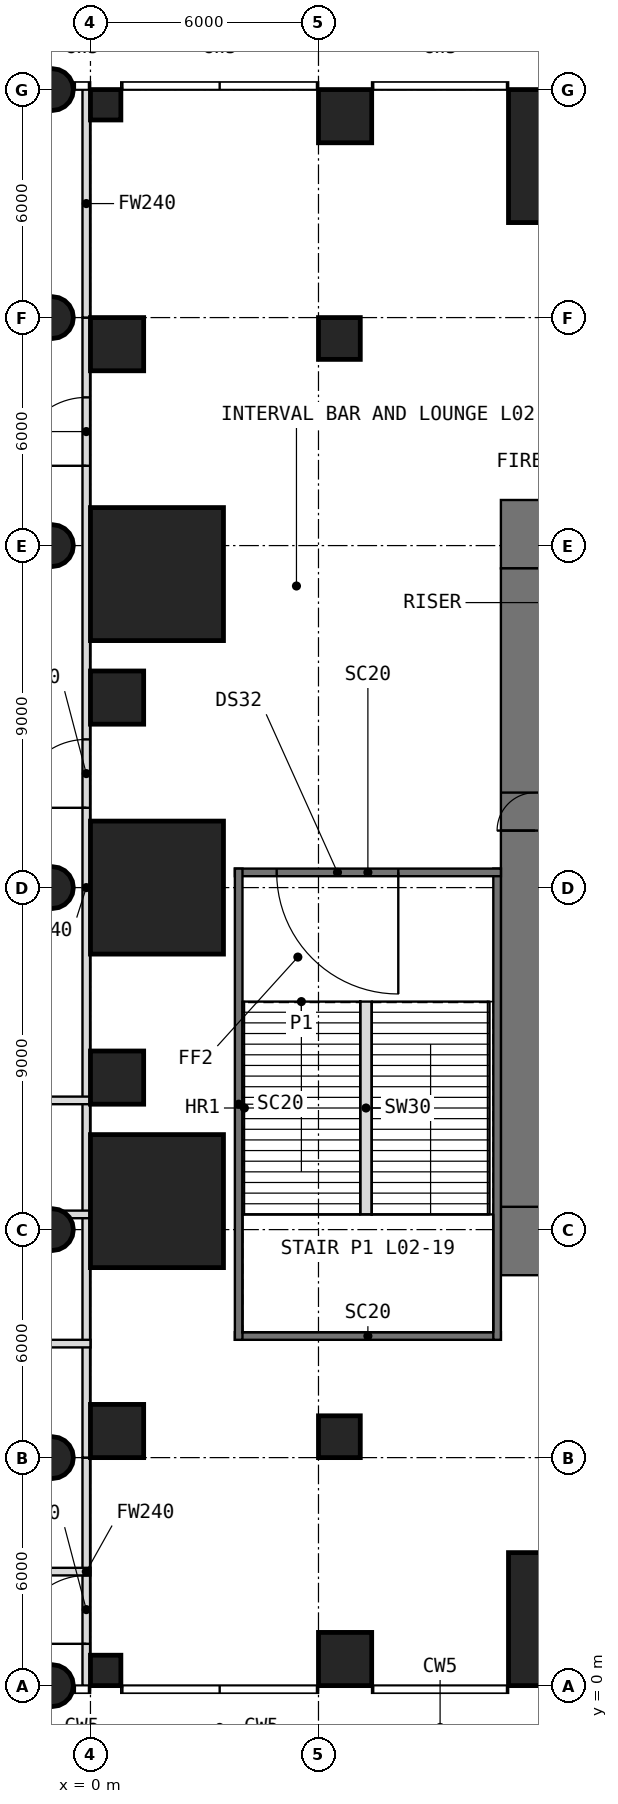
"""IFC4 building model, lengths in metres.
Left out: names, types, materials, properties, quantities, classifications, styles, units other than length and angle.
Written with IfcOpenShell. Run it as: python <this file> out.ifc"""

import sys

from ifc_helpers import new_model, si_unit, direction, frame, frame_2d, origin, origin_2d, place, context, subcontext, project, spatial, rectangle, circle, extrude, element, fill, save


model = new_model("IFC4")
c1 = context("Model", 3, precision=1e-05, world=origin(), true_north=direction((0.0, 1.0)))
c2 = subcontext(c1, "Body", "Model", "MODEL_VIEW")
j1 = project(units=[si_unit("LENGTHUNIT", "METRE"), si_unit("PLANEANGLEUNIT", "RADIAN")], contexts=[c1])
p1 = place(None, origin())
s1 = spatial("IfcSite", under=j1, at=p1, CompositionType="ELEMENT")
p2 = place(p1, origin())
s2 = spatial("IfcBuilding", under=s1, at=p2, CompositionType="ELEMENT")
p3 = place(p2, frame((0.0, 0.0, 11.0)))
s3 = spatial("IfcBuildingStorey", under=s2, at=p3, CompositionType="ELEMENT", Elevation=11.0)
p4 = place(p3, frame((-1.0, 0.0, 0.0), z_axis=(0.0, 0.0, 1.0), x_axis=(1.0, 0.0, 0.0)))
e1 = element("IfcColumn", 1, at=p4, inside=s3, PredefinedType="COLUMN", context=c2, shape_type="SweptSolid", body=[
    extrude(circle(Radius=0.55, at=origin_2d()), origin(), (0.0, 0.0, 1.0), 7.0),
])
p5 = place(p3, frame((0.4, 0.4, 0.0), z_axis=(0.0, 0.0, 1.0), x_axis=(1.0, 0.0, 0.0)))
e2 = element("IfcColumn", 2, at=p5, inside=s3, PredefinedType="COLUMN", context=c2, shape_type="SweptSolid", body=[
    extrude(rectangle(XDim=0.8, YDim=0.8, at=origin_2d()), origin(), (0.0, 0.0, 1.0), 7.0),
])
p6 = place(p3, frame((6.7, 0.7, 0.0), z_axis=(0.0, 0.0, 1.0), x_axis=(1.0, 0.0, 0.0)))
e3 = element("IfcColumn", 3, at=p6, inside=s3, PredefinedType="COLUMN", context=c2, shape_type="SweptSolid", body=[
    extrude(rectangle(XDim=1.4, YDim=1.4, at=origin_2d()), origin(), (0.0, 0.0, 1.0), 7.0),
])
p7 = place(p3, frame((12.75, 1.75, 0.0), z_axis=(0.0, 0.0, 1.0), x_axis=(1.0, 0.0, 0.0)))
e4 = element("IfcColumn", 4, at=p7, inside=s3, PredefinedType="COLUMN", context=c2, shape_type="SweptSolid", body=[
    extrude(rectangle(XDim=3.5, YDim=3.5, at=origin_2d()), origin(), (0.0, 0.0, 1.0), 7.0),
])
p8 = place(p3, frame((-1.0, 6.0, 0.0), z_axis=(0.0, 0.0, 1.0), x_axis=(1.0, 0.0, 0.0)))
e5 = element("IfcColumn", 5, at=p8, inside=s3, PredefinedType="COLUMN", context=c2, shape_type="SweptSolid", body=[
    extrude(circle(Radius=0.55, at=origin_2d()), origin(), (0.0, 0.0, 1.0), 7.0),
])
p9 = place(p3, frame((0.7, 6.7, 0.0), z_axis=(0.0, 0.0, 1.0), x_axis=(1.0, 0.0, 0.0)))
e6 = element("IfcColumn", 6, at=p9, inside=s3, PredefinedType="COLUMN", context=c2, shape_type="SweptSolid", body=[
    extrude(rectangle(XDim=1.4, YDim=1.4, at=origin_2d()), origin(), (0.0, 0.0, 1.0), 7.0),
])
p10 = place(p3, frame((6.55, 6.55, 0.0), z_axis=(0.0, 0.0, 1.0), x_axis=(1.0, 0.0, 0.0)))
e7 = element("IfcColumn", 7, at=p10, inside=s3, PredefinedType="COLUMN", context=c2, shape_type="SweptSolid", body=[
    extrude(rectangle(XDim=1.1, YDim=1.1, at=origin_2d()), origin(), (0.0, 0.0, 1.0), 7.0),
])
p11 = place(p3, frame((1.75, 12.75, 0.0), z_axis=(0.0, 0.0, 1.0), x_axis=(1.0, 0.0, 0.0)))
e8 = element("IfcColumn", 8, at=p11, inside=s3, PredefinedType="COLUMN", context=c2, shape_type="SweptSolid", body=[
    extrude(rectangle(XDim=3.5, YDim=3.5, at=origin_2d()), origin(), (0.0, 0.0, 1.0), 7.0),
])
p12 = place(p3, frame((-1.0, 12.0, 0.0), z_axis=(0.0, 0.0, 1.0), x_axis=(1.0, 0.0, 0.0)))
e9 = element("IfcColumn", 9, at=p12, inside=s3, PredefinedType="COLUMN", context=c2, shape_type="SweptSolid", body=[
    extrude(circle(Radius=0.55, at=origin_2d()), origin(), (0.0, 0.0, 1.0), 7.0),
])
p13 = place(p3, frame((-1.41, 12.0, 3.556), z_axis=(0.0, 0.0, 1.0), x_axis=(1.0, 0.0, 0.0)))
e10 = element("IfcOpeningElement", 10, at=p13, cuts=e9, PredefinedType="RECESS", context=c2, shape_type="SweptSolid", body=[
    extrude(rectangle(XDim=0.32, YDim=0.474, at=origin_2d()), origin(), (0.0, 0.0, 1.0), 0.719),
])
p14 = place(p3, frame((0.7, 16.0, 0.0), z_axis=(0.0, 0.0, 1.0), x_axis=(1.0, 0.0, 0.0)))
e11 = element("IfcColumn", 11, at=p14, inside=s3, PredefinedType="COLUMN", context=c2, shape_type="SweptSolid", body=[
    extrude(rectangle(XDim=1.4, YDim=1.4, at=origin_2d()), origin(), (0.0, 0.0, 1.0), 7.0),
])
p15 = place(p3, frame((-1.0, 21.0, 0.0), z_axis=(0.0, 0.0, 1.0), x_axis=(1.0, 0.0, 0.0)))
e12 = element("IfcColumn", 12, at=p15, inside=s3, PredefinedType="COLUMN", context=c2, shape_type="SweptSolid", body=[
    extrude(circle(Radius=0.55, at=origin_2d()), origin(), (0.0, 0.0, 1.0), 7.0),
])
p16 = place(p3, frame((-1.41, 21.0, 3.556), z_axis=(0.0, 0.0, 1.0), x_axis=(1.0, 0.0, 0.0)))
e13 = element("IfcOpeningElement", 13, at=p16, cuts=e12, PredefinedType="RECESS", context=c2, shape_type="SweptSolid", body=[
    extrude(rectangle(XDim=0.32, YDim=0.474, at=origin_2d()), origin(), (0.0, 0.0, 1.0), 0.719),
])
p17 = place(p3, frame((1.75, 21.0, 0.0), z_axis=(0.0, 0.0, 1.0), x_axis=(1.0, 0.0, 0.0)))
e14 = element("IfcColumn", 14, at=p17, inside=s3, PredefinedType="COLUMN", context=c2, shape_type="SweptSolid", body=[
    extrude(rectangle(XDim=3.5, YDim=3.5, at=origin_2d()), origin(), (0.0, 0.0, 1.0), 7.0),
])
p18 = place(p3, frame((0.7, 26.0, 0.0), z_axis=(0.0, 0.0, 1.0), x_axis=(1.0, 0.0, 0.0)))
e15 = element("IfcColumn", 15, at=p18, inside=s3, PredefinedType="COLUMN", context=c2, shape_type="SweptSolid", body=[
    extrude(rectangle(XDim=1.4, YDim=1.4, at=origin_2d()), origin(), (0.0, 0.0, 1.0), 7.0),
])
p19 = place(p3, frame((-1.0, 30.0, 0.0), z_axis=(0.0, 0.0, 1.0), x_axis=(1.0, 0.0, 0.0)))
e16 = element("IfcColumn", 16, at=p19, inside=s3, PredefinedType="COLUMN", context=c2, shape_type="SweptSolid", body=[
    extrude(circle(Radius=0.55, at=origin_2d()), origin(), (0.0, 0.0, 1.0), 7.0),
])
p20 = place(p3, frame((-1.41, 30.0, 3.556), z_axis=(0.0, 0.0, 1.0), x_axis=(1.0, 0.0, 0.0)))
e17 = element("IfcOpeningElement", 17, at=p20, cuts=e16, PredefinedType="RECESS", context=c2, shape_type="SweptSolid", body=[
    extrude(rectangle(XDim=0.32, YDim=0.474, at=origin_2d()), origin(), (0.0, 0.0, 1.0), 0.719),
])
p21 = place(p3, frame((1.75, 29.25, 0.0), z_axis=(0.0, 0.0, 1.0), x_axis=(1.0, 0.0, 0.0)))
e18 = element("IfcColumn", 18, at=p21, inside=s3, PredefinedType="COLUMN", context=c2, shape_type="SweptSolid", body=[
    extrude(rectangle(XDim=3.5, YDim=3.5, at=origin_2d()), origin(), (0.0, 0.0, 1.0), 7.0),
])
p22 = place(p3, frame((-1.0, 36.0, 0.0), z_axis=(0.0, 0.0, 1.0), x_axis=(1.0, 0.0, 0.0)))
e19 = element("IfcColumn", 19, at=p22, inside=s3, PredefinedType="COLUMN", context=c2, shape_type="SweptSolid", body=[
    extrude(circle(Radius=0.55, at=origin_2d()), origin(), (0.0, 0.0, 1.0), 7.0),
])
p23 = place(p3, frame((-1.41, 36.0, 3.556), z_axis=(0.0, 0.0, 1.0), x_axis=(1.0, 0.0, 0.0)))
e20 = element("IfcOpeningElement", 20, at=p23, cuts=e19, PredefinedType="RECESS", context=c2, shape_type="SweptSolid", body=[
    extrude(rectangle(XDim=0.32, YDim=0.474, at=origin_2d()), origin(), (0.0, 0.0, 1.0), 0.719),
])
p24 = place(p3, frame((0.7, 35.3, 0.0), z_axis=(0.0, 0.0, 1.0), x_axis=(1.0, 0.0, 0.0)))
e21 = element("IfcColumn", 21, at=p24, inside=s3, PredefinedType="COLUMN", context=c2, shape_type="SweptSolid", body=[
    extrude(rectangle(XDim=1.4, YDim=1.4, at=origin_2d()), origin(), (0.0, 0.0, 1.0), 7.0),
])
p25 = place(p3, frame((6.55, 35.45, 0.0), z_axis=(0.0, 0.0, 1.0), x_axis=(1.0, 0.0, 0.0)))
e22 = element("IfcColumn", 22, at=p25, inside=s3, PredefinedType="COLUMN", context=c2, shape_type="SweptSolid", body=[
    extrude(rectangle(XDim=1.1, YDim=1.1, at=origin_2d()), origin(), (0.0, 0.0, 1.0), 7.0),
])
p26 = place(p3, frame((-1.0, 42.0, 0.0), z_axis=(0.0, 0.0, 1.0), x_axis=(1.0, 0.0, 0.0)))
e23 = element("IfcColumn", 23, at=p26, inside=s3, PredefinedType="COLUMN", context=c2, shape_type="SweptSolid", body=[
    extrude(circle(Radius=0.55, at=origin_2d()), origin(), (0.0, 0.0, 1.0), 7.0),
])
p27 = place(p3, frame((0.4, 41.6, 0.0), z_axis=(0.0, 0.0, 1.0), x_axis=(1.0, 0.0, 0.0)))
e24 = element("IfcColumn", 24, at=p27, inside=s3, PredefinedType="COLUMN", context=c2, shape_type="SweptSolid", body=[
    extrude(rectangle(XDim=0.8, YDim=0.8, at=origin_2d()), origin(), (0.0, 0.0, 1.0), 7.0),
])
p28 = place(p3, frame((6.7, 41.3, 0.0), z_axis=(0.0, 0.0, 1.0), x_axis=(1.0, 0.0, 0.0)))
e25 = element("IfcColumn", 25, at=p28, inside=s3, PredefinedType="COLUMN", context=c2, shape_type="SweptSolid", body=[
    extrude(rectangle(XDim=1.4, YDim=1.4, at=origin_2d()), origin(), (0.0, 0.0, 1.0), 7.0),
])
p29 = place(p3, frame((12.75, 40.25, 0.0), z_axis=(0.0, 0.0, 1.0), x_axis=(1.0, 0.0, 0.0)))
e26 = element("IfcColumn", 26, at=p29, inside=s3, PredefinedType="COLUMN", context=c2, shape_type="SweptSolid", body=[
    extrude(rectangle(XDim=3.5, YDim=3.5, at=origin_2d()), origin(), (0.0, 0.0, 1.0), 7.0),
])
p30 = place(p3, frame((10.8, 11.7, -0.3), z_axis=(0.0, 0.0, 1.0), x_axis=(1.0, 0.0, 0.0)))
e27 = element("IfcWall", 27, at=p30, inside=s3, PredefinedType="SHEAR", context=c2, shape_type="SweptSolid", body=[
    extrude(rectangle(XDim=20.4, YDim=1.8, at=frame_2d((10.2, 0.0))), origin(), (0.0, 0.0, 1.0), 7.1),
])
p31 = place(p30, frame((9.2, 0.0, 0.3)))
e28 = element("IfcOpeningElement", 28, at=p31, cuts=e27, PredefinedType="OPENING", context=c2, shape_type="SweptSolid", body=[
    extrude(rectangle(XDim=2.0, YDim=2.2, at=frame_2d((1.0, 1.1))), frame((0.0, 0.91, 0.0), z_axis=(0.0, -1.0, 0.0), x_axis=(1.0, 0.0, 0.0)), (0.0, 0.0, 1.0), 1.82),
])
p32 = place(p3, frame((10.8, 30.3, -0.3), z_axis=(0.0, 0.0, 1.0), x_axis=(1.0, 0.0, 0.0)))
e29 = element("IfcWall", 29, at=p32, inside=s3, PredefinedType="SHEAR", context=c2, shape_type="SweptSolid", body=[
    extrude(rectangle(XDim=20.4, YDim=1.8, at=frame_2d((10.2, 0.0))), origin(), (0.0, 0.0, 1.0), 7.1),
])
p33 = place(p32, frame((9.2, 0.0, 0.3)))
e30 = element("IfcOpeningElement", 30, at=p33, cuts=e29, PredefinedType="OPENING", context=c2, shape_type="SweptSolid", body=[
    extrude(rectangle(XDim=2.0, YDim=2.2, at=frame_2d((1.0, 1.1))), frame((0.0, 0.91, 0.0), z_axis=(0.0, -1.0, 0.0), x_axis=(1.0, 0.0, 0.0)), (0.0, 0.0, 1.0), 1.82),
])
p34 = place(p3, frame((11.7, 12.6, -0.3), z_axis=(0.0, 0.0, 1.0), x_axis=(0.0, 1.0, 0.0)))
e31 = element("IfcWall", 31, at=p34, inside=s3, PredefinedType="SHEAR", context=c2, shape_type="SweptSolid", body=[
    extrude(rectangle(XDim=16.8, YDim=1.8, at=frame_2d((8.4, 0.0))), origin(), (0.0, 0.0, 1.0), 7.1),
])
p35 = place(p34, frame((9.9, 0.0, 0.3)))
e32 = element("IfcOpeningElement", 32, at=p35, cuts=e31, PredefinedType="OPENING", context=c2, shape_type="SweptSolid", body=[
    extrude(rectangle(XDim=1.0, YDim=2.2, at=frame_2d((0.5, 1.1))), frame((0.0, 0.91, 0.0), z_axis=(0.0, -1.0, 0.0), x_axis=(1.0, 0.0, 0.0)), (0.0, 0.0, 1.0), 1.82),
])
p36 = place(p3, frame((3.8, 9.2, -0.3), z_axis=(0.0, 0.0, 1.0), x_axis=(1.0, 0.0, 0.0)))
e33 = element("IfcWall", 33, at=p36, inside=s3, PredefinedType="SOLIDWALL", context=c2, shape_type="SweptSolid", body=[
    extrude(rectangle(XDim=7.0, YDim=0.2, at=frame_2d((3.5, 0.0))), origin(), (0.0, 0.0, 1.0), 7.1),
])
p37 = place(p3, frame((10.7, 9.1, -0.3), z_axis=(0.0, 0.0, 1.0), x_axis=(0.0, 1.0, 0.0)))
e34 = element("IfcWall", 34, at=p37, inside=s3, PredefinedType="SOLIDWALL", context=c2, shape_type="SweptSolid", body=[
    extrude(rectangle(XDim=12.4, YDim=0.2, at=frame_2d((6.2, 0.0))), origin(), (0.0, 0.0, 1.0), 7.1),
])
p38 = place(p3, frame((10.8, 21.4, -0.3), z_axis=(0.0, 0.0, 1.0), x_axis=(-1.0, 0.0, 0.0)))
e35 = element("IfcWall", 35, at=p38, inside=s3, PredefinedType="SOLIDWALL", context=c2, shape_type="SweptSolid", body=[
    extrude(rectangle(XDim=7.0, YDim=0.2, at=frame_2d((3.5, 0.0))), origin(), (0.0, 0.0, 1.0), 7.1),
])
p39 = place(p38, frame((2.7, 0.0, 0.3)))
e36 = element("IfcOpeningElement", 36, at=p39, cuts=e35, PredefinedType="OPENING", context=c2, shape_type="SweptSolid", body=[
    extrude(rectangle(XDim=3.2, YDim=2.4, at=frame_2d((1.6, 1.2))), frame((0.0, 0.11, 0.0), z_axis=(0.0, -1.0, 0.0), x_axis=(1.0, 0.0, 0.0)), (0.0, 0.0, 1.0), 0.22),
])
p40 = place(p3, frame((3.9, 21.5, -0.3), z_axis=(0.0, 0.0, 1.0), x_axis=(0.0, -1.0, 0.0)))
e37 = element("IfcWall", 37, at=p40, inside=s3, PredefinedType="SOLIDWALL", context=c2, shape_type="SweptSolid", body=[
    extrude(rectangle(XDim=12.4, YDim=0.2, at=frame_2d((6.2, 0.0))), origin(), (0.0, 0.0, 1.0), 7.1),
])
p41 = place(p3, frame((-0.11, 0.0, 0.0), z_axis=(0.0, 0.0, 1.0), x_axis=(0.0, 1.0, 0.0)))
e38 = element("IfcWall", 38, at=p41, inside=s3, PredefinedType="PARTITIONING", context=c2, shape_type="SweptSolid", body=[
    extrude(rectangle(XDim=6.0, YDim=0.2, at=frame_2d((3.0, 0.0))), origin(), (0.0, 0.0, 1.0), 5.98),
])
p42 = place(p41, frame((1.1, 0.0, 0.0)))
e39 = element("IfcOpeningElement", 39, at=p42, cuts=e38, PredefinedType="OPENING", context=c2, shape_type="SweptSolid", body=[
    extrude(rectangle(XDim=1.8, YDim=2.4, at=frame_2d((0.9, 1.2))), frame((0.0, 0.11, 0.0), z_axis=(0.0, -1.0, 0.0), x_axis=(1.0, 0.0, 0.0)), (0.0, 0.0, 1.0), 0.22),
])
p43 = place(p3, frame((-0.11, 6.0, 0.0), z_axis=(0.0, 0.0, 1.0), x_axis=(0.0, 1.0, 0.0)))
e40 = element("IfcWall", 40, at=p43, inside=s3, PredefinedType="PARTITIONING", context=c2, shape_type="SweptSolid", body=[
    extrude(rectangle(XDim=30.0, YDim=0.2, at=frame_2d((15.0, 0.0))), origin(), (0.0, 0.0, 1.0), 6.6),
])
p44 = place(p43, frame((17.1, 0.0, 0.0)))
e41 = element("IfcOpeningElement", 41, at=p44, cuts=e40, PredefinedType="OPENING", context=c2, shape_type="SweptSolid", body=[
    extrude(rectangle(XDim=1.8, YDim=2.4, at=frame_2d((0.9, 1.2))), frame((0.0, 0.11, 0.0), z_axis=(0.0, -1.0, 0.0), x_axis=(1.0, 0.0, 0.0)), (0.0, 0.0, 1.0), 0.22),
])
p45 = place(p43, frame((26.1, 0.0, 0.0)))
e42 = element("IfcOpeningElement", 42, at=p45, cuts=e40, PredefinedType="OPENING", context=c2, shape_type="SweptSolid", body=[
    extrude(rectangle(XDim=1.8, YDim=2.4, at=frame_2d((0.9, 1.2))), frame((0.0, 0.11, 0.0), z_axis=(0.0, -1.0, 0.0), x_axis=(1.0, 0.0, 0.0)), (0.0, 0.0, 1.0), 0.22),
])
p46 = place(p3, frame((-0.11, 36.0, 0.0), z_axis=(0.0, 0.0, 1.0), x_axis=(0.0, 1.0, 0.0)))
e43 = element("IfcWall", 43, at=p46, inside=s3, PredefinedType="PARTITIONING", context=c2, shape_type="SweptSolid", body=[
    extrude(rectangle(XDim=6.0, YDim=0.2, at=frame_2d((3.0, 0.0))), origin(), (0.0, 0.0, 1.0), 5.98),
])
p47 = place(p3, frame((-21.0, 12.4, 0.0), z_axis=(0.0, 0.0, 1.0), x_axis=(1.0, 0.0, 0.0)))
e44 = element("IfcWall", 44, at=p47, inside=s3, PredefinedType="PARTITIONING", context=c2, shape_type="SweptSolid", body=[
    extrude(rectangle(XDim=21.0, YDim=0.2, at=frame_2d((10.5, 0.0))), origin(), (0.0, 0.0, 1.0), 6.6),
])
p48 = place(p47, frame((10.5, 0.0, 0.0)))
e45 = element("IfcOpeningElement", 45, at=p48, cuts=e44, PredefinedType="OPENING", context=c2, shape_type="SweptSolid", body=[
    extrude(rectangle(XDim=1.0, YDim=2.2, at=frame_2d((0.5, 1.1))), frame((0.0, 0.11, 0.0), z_axis=(0.0, -1.0, 0.0), x_axis=(1.0, 0.0, 0.0)), (0.0, 0.0, 1.0), 0.22),
])
p49 = place(p3, frame((-21.0, 15.4, 0.0), z_axis=(0.0, 0.0, 1.0), x_axis=(1.0, 0.0, 0.0)))
e46 = element("IfcWall", 46, at=p49, inside=s3, PredefinedType="PARTITIONING", context=c2, shape_type="SweptSolid", body=[
    extrude(rectangle(XDim=21.0, YDim=0.2, at=frame_2d((10.5, 0.0))), origin(), (0.0, 0.0, 1.0), 6.6),
])
p50 = place(p3, frame((-13.5, 3.0, 0.0), z_axis=(0.0, 0.0, 1.0), x_axis=(1.0, 0.0, 0.0)))
e47 = element("IfcWall", 47, at=p50, inside=s3, PredefinedType="PARTITIONING", context=c2, shape_type="SweptSolid", body=[
    extrude(rectangle(XDim=13.5, YDim=0.2, at=frame_2d((6.75, 0.0))), origin(), (0.0, 0.0, 1.0), 6.6),
])
p51 = place(p3, frame((-13.5, 9.0, 0.0), z_axis=(0.0, 0.0, 1.0), x_axis=(1.0, 0.0, 0.0)))
e48 = element("IfcWall", 48, at=p51, inside=s3, PredefinedType="PARTITIONING", context=c2, shape_type="SweptSolid", body=[
    extrude(rectangle(XDim=13.5, YDim=0.2, at=frame_2d((6.75, 0.0))), origin(), (0.0, 0.0, 1.0), 6.6),
])
p52 = place(p51, frame((6.25, 0.0, 0.0)))
e49 = element("IfcOpeningElement", 49, at=p52, cuts=e48, PredefinedType="OPENING", context=c2, shape_type="SweptSolid", body=[
    extrude(rectangle(XDim=1.0, YDim=2.2, at=frame_2d((0.5, 1.1))), frame((0.0, 0.11, 0.0), z_axis=(0.0, -1.0, 0.0), x_axis=(1.0, 0.0, 0.0)), (0.0, 0.0, 1.0), 0.22),
])
p53 = place(p3, frame((7.25, 12.4, 0.0), z_axis=(0.0, 0.0, 1.0), x_axis=(0.0, 1.0, 0.0)))
e50 = element("IfcWall", 50, at=p53, inside=s3, PredefinedType="PARTITIONING", context=c2, shape_type="SweptSolid", body=[
    extrude(rectangle(XDim=5.6, YDim=0.3, at=frame_2d((2.8, 0.0))), origin(), (0.0, 0.0, 1.0), 7.0),
])
p54 = place(p35, origin())
e51 = element("IfcDoor", 51, at=p54, inside=s3, OperationType="SINGLE_SWING_LEFT", PredefinedType="DOOR", context=c2, shape_type="SweptSolid", body=[
    extrude(rectangle(XDim=1.0, YDim=2.2, at=frame_2d((0.5, 1.1))), frame((0.0, 0.025, 0.0), z_axis=(0.0, -1.0, 0.0), x_axis=(1.0, 0.0, 0.0)), (0.0, 0.0, 1.0), 0.05),
])
fill(e32, e51)
p55 = place(p39, origin())
e52 = element("IfcDoor", 52, at=p55, inside=s3, OperationType="DOUBLE_DOOR_SINGLE_SWING", PredefinedType="DOOR", context=c2, shape_type="SweptSolid", body=[
    extrude(rectangle(XDim=3.2, YDim=2.4, at=frame_2d((1.6, 1.2))), frame((0.0, 0.025, 0.0), z_axis=(0.0, -1.0, 0.0), x_axis=(1.0, 0.0, 0.0)), (0.0, 0.0, 1.0), 0.05),
])
fill(e36, e52)
p56 = place(p42, origin())
e53 = element("IfcDoor", 53, at=p56, inside=s3, OperationType="DOUBLE_DOOR_SINGLE_SWING", PredefinedType="DOOR", context=c2, shape_type="SweptSolid", body=[
    extrude(rectangle(XDim=1.8, YDim=2.4, at=frame_2d((0.9, 1.2))), frame((0.0, 0.025, 0.0), z_axis=(0.0, -1.0, 0.0), x_axis=(1.0, 0.0, 0.0)), (0.0, 0.0, 1.0), 0.05),
])
fill(e39, e53)
p57 = place(p44, origin())
e54 = element("IfcDoor", 54, at=p57, inside=s3, OperationType="DOUBLE_DOOR_SINGLE_SWING", PredefinedType="DOOR", context=c2, shape_type="SweptSolid", body=[
    extrude(rectangle(XDim=1.8, YDim=2.4, at=frame_2d((0.9, 1.2))), frame((0.0, 0.025, 0.0), z_axis=(0.0, -1.0, 0.0), x_axis=(1.0, 0.0, 0.0)), (0.0, 0.0, 1.0), 0.05),
])
fill(e41, e54)
p58 = place(p45, origin())
e55 = element("IfcDoor", 55, at=p58, inside=s3, OperationType="DOUBLE_DOOR_SINGLE_SWING", PredefinedType="DOOR", context=c2, shape_type="SweptSolid", body=[
    extrude(rectangle(XDim=1.8, YDim=2.4, at=frame_2d((0.9, 1.2))), frame((0.0, 0.025, 0.0), z_axis=(0.0, -1.0, 0.0), x_axis=(1.0, 0.0, 0.0)), (0.0, 0.0, 1.0), 0.05),
])
fill(e42, e55)
save(model, sys.argv[1])
